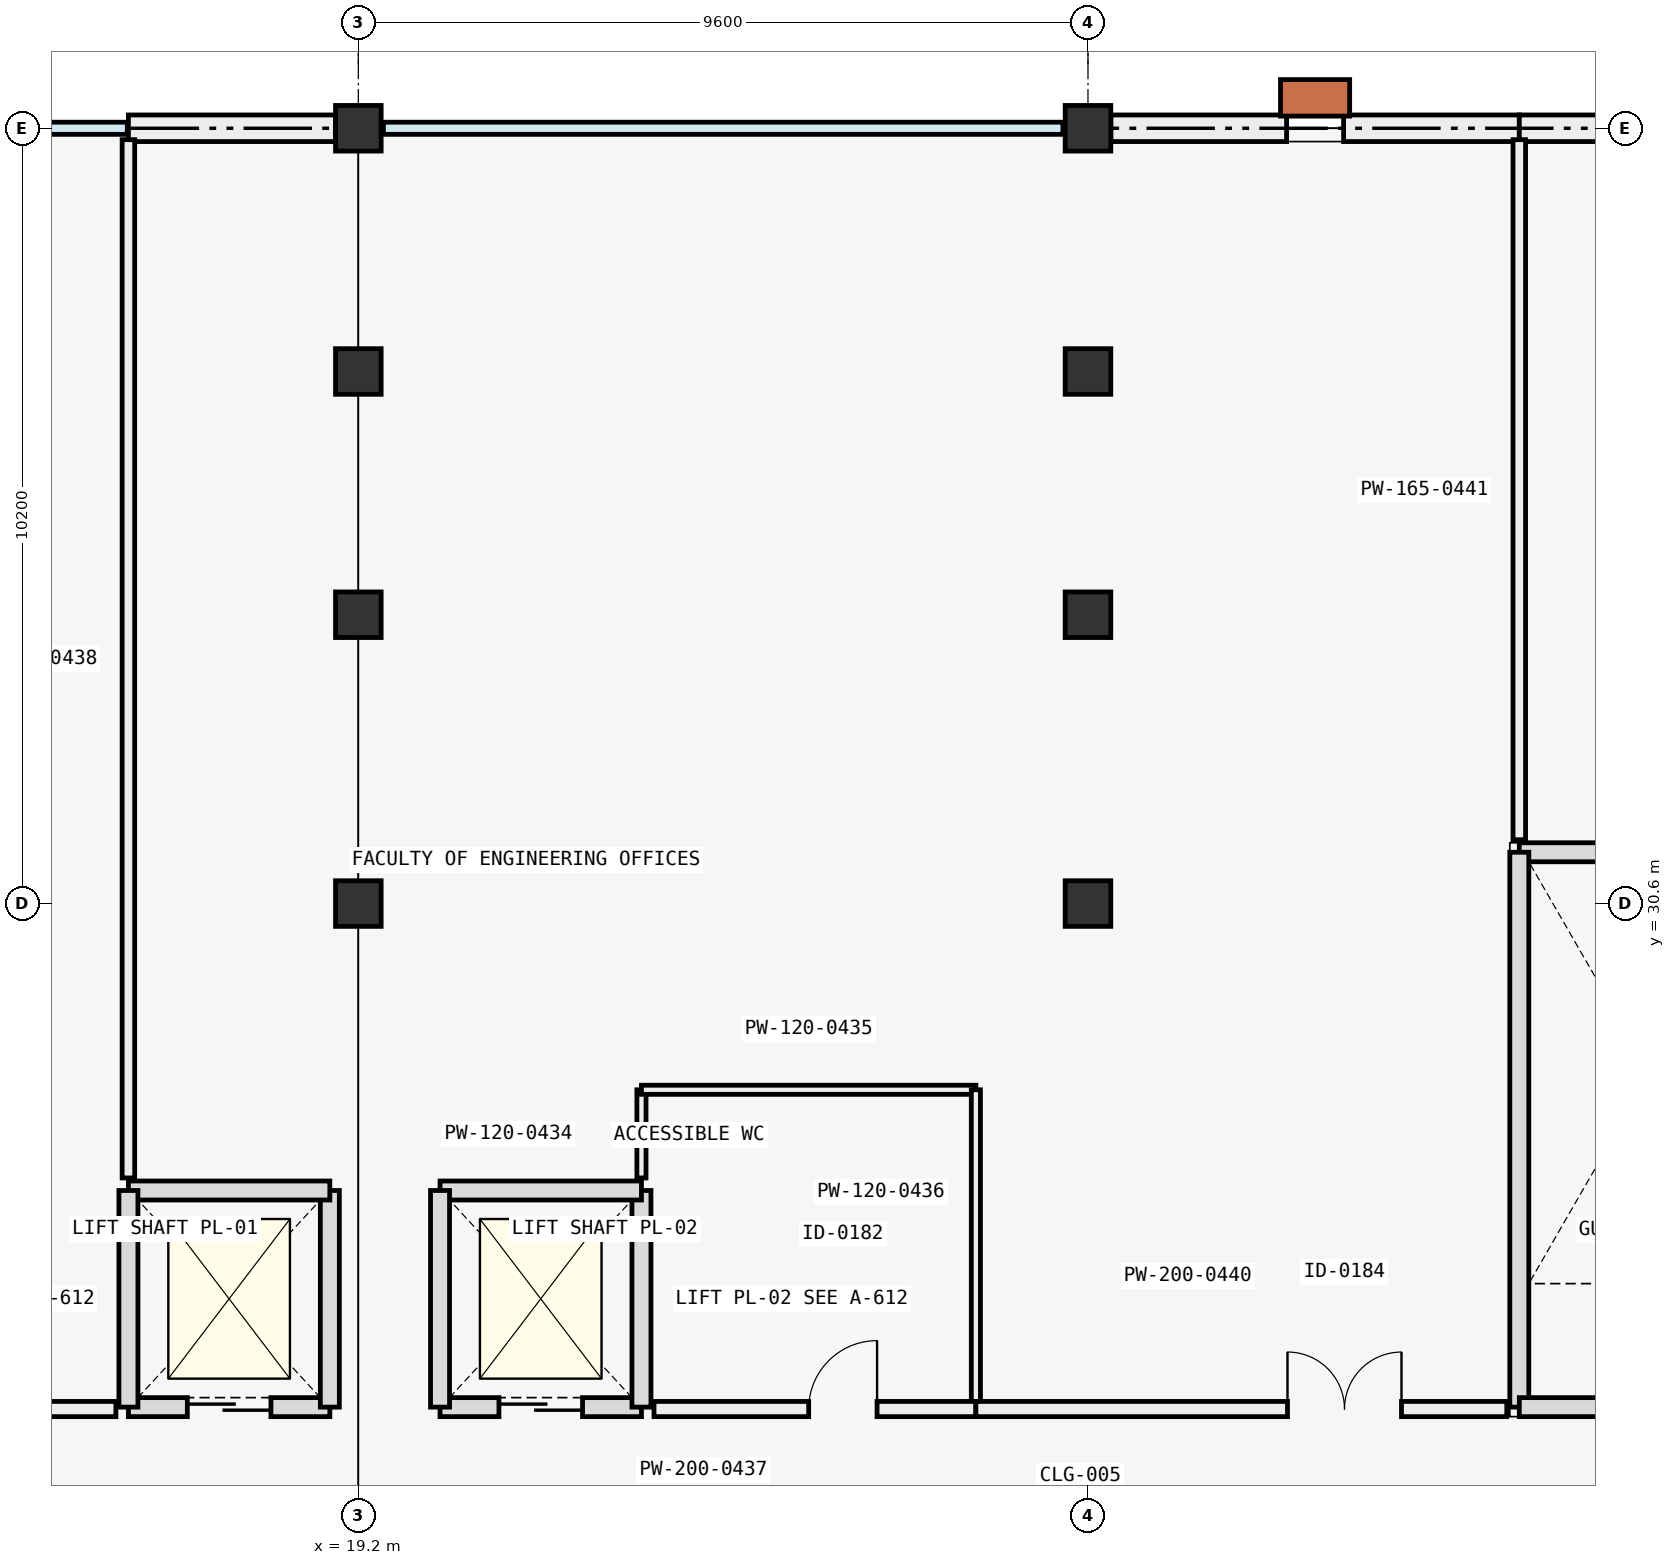
"""IFC4 building model, lengths in metres.
Left out: names, types, materials, properties, quantities, classifications, styles, units other than length and angle.
Written with IfcOpenShell. Run it as: python <this file> out.ifc"""

import sys

from ifc_helpers import new_model, si_unit, direction, frame, frame_2d, origin, origin_2d, place, context, subcontext, project, spatial, rectangle, extrude, element, fill, save


model = new_model("IFC4")
c1 = context("Model", 3, precision=1e-05, world=origin(), true_north=direction((0.0, 1.0)))
c2 = subcontext(c1, "Body", "Model", "MODEL_VIEW")
j1 = project(units=[si_unit("LENGTHUNIT", "METRE"), si_unit("PLANEANGLEUNIT", "RADIAN")], contexts=[c1])
p1 = place(None, origin())
s1 = spatial("IfcSite", under=j1, at=p1, CompositionType="ELEMENT")
p2 = place(p1, origin())
s2 = spatial("IfcBuilding", under=s1, at=p2, CompositionType="ELEMENT")
p3 = place(p2, frame((0.0, 0.0, 18.0)))
s3 = spatial("IfcBuildingStorey", under=s2, at=p3, CompositionType="ELEMENT", Elevation=18.0)
for number, where, z_axis, x_axis in (
    (1, (19.2, 30.6, 0.0), (0.0, 0.0, 1.0), (1.0, 0.0, 0.0)),
    (2, (19.2, 34.4, 0.0), (0.0, 0.0, 1.0), (1.0, 0.0, 0.0)),
    (3, (19.2, 37.6, 0.0), (0.0, 0.0, 1.0), (1.0, 0.0, 0.0)),
    (4, (19.2, 40.8, 0.0), (0.0, 0.0, 1.0), (1.0, 0.0, 0.0)),
    (5, (28.8, 30.6, 0.0), (0.0, 0.0, 1.0), (1.0, 0.0, 0.0)),
    (6, (28.8, 34.4, 0.0), (0.0, 0.0, 1.0), (1.0, 0.0, 0.0)),
    (7, (28.8, 37.6, 0.0), (0.0, 0.0, 1.0), (1.0, 0.0, 0.0)),
    (8, (28.8, 40.8, 0.0), (0.0, 0.0, 1.0), (1.0, 0.0, 0.0)),
):
    element("IfcColumn", number, at=place(p3, frame(where, z_axis=z_axis, x_axis=x_axis)), inside=s3, PredefinedType="COLUMN", context=c2, shape_type="SweptSolid", body=[
        extrude(rectangle(XDim=0.6, YDim=0.6, at=origin_2d()), origin(), (0.0, 0.0, 1.0), 4.2),
    ])
p4 = place(p3, frame((16.175, 40.8, 0.0), z_axis=(0.0, 0.0, 1.0), x_axis=(1.0, 0.0, 0.0)))
e9 = element("IfcWall", 9, at=p4, inside=s3, PredefinedType="SOLIDWALL", context=c2, shape_type="SweptSolid", body=[
    extrude(rectangle(XDim=2.724, YDim=0.35, at=frame_2d((1.362, 0.0))), origin(), (0.0, 0.0, 1.0), 2.33),
])
p5 = place(p3, frame((29.101, 40.8, 0.0), z_axis=(0.0, 0.0, 1.0), x_axis=(1.0, 0.0, 0.0)))
e10 = element("IfcWall", 10, at=p5, inside=s3, PredefinedType="SOLIDWALL", context=c2, shape_type="SweptSolid", body=[
    extrude(rectangle(XDim=5.374, YDim=0.35, at=frame_2d((2.687, 0.0))), origin(), (0.0, 0.0, 1.0), 2.33),
])
p6 = place(p5, frame((2.312, 0.0, 0.85)))
e11 = element("IfcOpeningElement", 11, at=p6, cuts=e10, PredefinedType="OPENING", context=c2, shape_type="SweptSolid", body=[
    extrude(rectangle(XDim=0.75, YDim=1.1, at=frame_2d((0.375, 0.55))), frame((0.0, 0.185, 0.0), z_axis=(0.0, -1.0, 0.0), x_axis=(1.0, 0.0, 0.0)), (0.0, 0.0, 1.0), 0.37),
])
p7 = place(p3, frame((34.475, 40.8, 0.0), z_axis=(0.0, 0.0, 1.0), x_axis=(1.0, 0.0, 0.0)))
e12 = element("IfcWall", 12, at=p7, inside=s3, PredefinedType="SOLIDWALL", context=c2, shape_type="SweptSolid", body=[
    extrude(rectangle(XDim=3.624, YDim=0.35, at=frame_2d((1.812, 0.0))), origin(), (0.0, 0.0, 1.0), 2.33),
])
p8 = place(p7, frame((1.437, 0.0, 0.85)))
e13 = element("IfcOpeningElement", 13, at=p8, cuts=e12, PredefinedType="OPENING", context=c2, shape_type="SweptSolid", body=[
    extrude(rectangle(XDim=0.75, YDim=1.1, at=frame_2d((0.375, 0.55))), frame((0.0, 0.185, 0.0), z_axis=(0.0, -1.0, 0.0), x_axis=(1.0, 0.0, 0.0)), (0.0, 0.0, 1.0), 0.37),
])
p9 = place(p3, frame((37.925, 31.275, 0.0), z_axis=(0.0, 0.0, 1.0), x_axis=(-1.0, 0.0, 0.0)))
e14 = element("IfcWall", 14, at=p9, inside=s3, PredefinedType="SOLIDWALL", context=c2, shape_type="SweptSolid", body=[
    extrude(rectangle(XDim=3.45, YDim=0.25, at=frame_2d((1.725, 0.0))), origin(), (0.0, 0.0, 1.0), 3.15),
])
p10 = place(p3, frame((34.475, 31.275, 0.0), z_axis=(0.0, 0.0, 1.0), x_axis=(0.0, -1.0, 0.0)))
e15 = element("IfcWall", 15, at=p10, inside=s3, PredefinedType="SOLIDWALL", context=c2, shape_type="SweptSolid", body=[
    extrude(rectangle(XDim=7.3, YDim=0.25, at=frame_2d((3.65, 0.0))), origin(), (0.0, 0.0, 1.0), 3.15),
])
p11 = place(p3, frame((34.475, 23.975, 0.0), z_axis=(0.0, 0.0, 1.0), x_axis=(1.0, 0.0, 0.0)))
e16 = element("IfcWall", 16, at=p11, inside=s3, PredefinedType="SOLIDWALL", context=c2, shape_type="SweptSolid", body=[
    extrude(rectangle(XDim=3.45, YDim=0.25, at=frame_2d((1.725, 0.0))), origin(), (0.0, 0.0, 1.0), 3.15),
])
p12 = place(p11, frame((1.175, 0.0, 0.0)))
e17 = element("IfcOpeningElement", 17, at=p12, cuts=e16, PredefinedType="OPENING", context=c2, shape_type="SweptSolid", body=[
    extrude(rectangle(XDim=1.1, YDim=2.2, at=frame_2d((0.55, 1.1))), frame((0.0, 0.135, 0.0), z_axis=(0.0, -1.0, 0.0), x_axis=(1.0, 0.0, 0.0)), (0.0, 0.0, 1.0), 0.27),
])
p13 = place(p3, frame((16.175, 23.975, 0.0), z_axis=(0.0, 0.0, 1.0), x_axis=(1.0, 0.0, 0.0)))
e18 = element("IfcWall", 18, at=p13, inside=s3, PredefinedType="SOLIDWALL", context=c2, shape_type="SweptSolid", body=[
    extrude(rectangle(XDim=2.65, YDim=0.25, at=frame_2d((1.325, 0.0))), origin(), (0.0, 0.0, 1.0), 3.95),
])
p14 = place(p13, frame((0.775, 0.0, 0.0)))
e19 = element("IfcOpeningElement", 19, at=p14, cuts=e18, PredefinedType="OPENING", context=c2, shape_type="SweptSolid", body=[
    extrude(rectangle(XDim=1.1, YDim=2.1, at=frame_2d((0.55, 1.05))), frame((0.0, 0.135, 0.0), z_axis=(0.0, -1.0, 0.0), x_axis=(1.0, 0.0, 0.0)), (0.0, 0.0, 1.0), 0.27),
])
p15 = place(p3, frame((18.825, 23.975, 0.0), z_axis=(0.0, 0.0, 1.0), x_axis=(0.0, 1.0, 0.0)))
e20 = element("IfcWall", 20, at=p15, inside=s3, PredefinedType="SOLIDWALL", context=c2, shape_type="SweptSolid", body=[
    extrude(rectangle(XDim=2.85, YDim=0.25, at=frame_2d((1.425, 0.0))), origin(), (0.0, 0.0, 1.0), 3.95),
])
p16 = place(p3, frame((18.825, 26.825, 0.0), z_axis=(0.0, 0.0, 1.0), x_axis=(-1.0, 0.0, 0.0)))
e21 = element("IfcWall", 21, at=p16, inside=s3, PredefinedType="SOLIDWALL", context=c2, shape_type="SweptSolid", body=[
    extrude(rectangle(XDim=2.65, YDim=0.25, at=frame_2d((1.325, 0.0))), origin(), (0.0, 0.0, 1.0), 3.95),
])
p17 = place(p3, frame((16.175, 26.825, 0.0), z_axis=(0.0, 0.0, 1.0), x_axis=(0.0, -1.0, 0.0)))
e22 = element("IfcWall", 22, at=p17, inside=s3, PredefinedType="SOLIDWALL", context=c2, shape_type="SweptSolid", body=[
    extrude(rectangle(XDim=2.85, YDim=0.25, at=frame_2d((1.425, 0.0))), origin(), (0.0, 0.0, 1.0), 3.95),
])
p18 = place(p3, frame((20.275, 23.975, 0.0), z_axis=(0.0, 0.0, 1.0), x_axis=(1.0, 0.0, 0.0)))
e23 = element("IfcWall", 23, at=p18, inside=s3, PredefinedType="SOLIDWALL", context=c2, shape_type="SweptSolid", body=[
    extrude(rectangle(XDim=2.65, YDim=0.25, at=frame_2d((1.325, 0.0))), origin(), (0.0, 0.0, 1.0), 3.95),
])
p19 = place(p18, frame((0.775, 0.0, 0.0)))
e24 = element("IfcOpeningElement", 24, at=p19, cuts=e23, PredefinedType="OPENING", context=c2, shape_type="SweptSolid", body=[
    extrude(rectangle(XDim=1.1, YDim=2.1, at=frame_2d((0.55, 1.05))), frame((0.0, 0.135, 0.0), z_axis=(0.0, -1.0, 0.0), x_axis=(1.0, 0.0, 0.0)), (0.0, 0.0, 1.0), 0.27),
])
p20 = place(p3, frame((22.925, 23.975, 0.0), z_axis=(0.0, 0.0, 1.0), x_axis=(0.0, 1.0, 0.0)))
e25 = element("IfcWall", 25, at=p20, inside=s3, PredefinedType="SOLIDWALL", context=c2, shape_type="SweptSolid", body=[
    extrude(rectangle(XDim=2.85, YDim=0.25, at=frame_2d((1.425, 0.0))), origin(), (0.0, 0.0, 1.0), 3.95),
])
p21 = place(p3, frame((22.925, 26.825, 0.0), z_axis=(0.0, 0.0, 1.0), x_axis=(-1.0, 0.0, 0.0)))
e26 = element("IfcWall", 26, at=p21, inside=s3, PredefinedType="SOLIDWALL", context=c2, shape_type="SweptSolid", body=[
    extrude(rectangle(XDim=2.65, YDim=0.25, at=frame_2d((1.325, 0.0))), origin(), (0.0, 0.0, 1.0), 3.95),
])
p22 = place(p3, frame((20.275, 26.825, 0.0), z_axis=(0.0, 0.0, 1.0), x_axis=(0.0, -1.0, 0.0)))
e27 = element("IfcWall", 27, at=p22, inside=s3, PredefinedType="SOLIDWALL", context=c2, shape_type="SweptSolid", body=[
    extrude(rectangle(XDim=2.85, YDim=0.25, at=frame_2d((1.425, 0.0))), origin(), (0.0, 0.0, 1.0), 3.95),
])
p23 = place(p3, frame((22.925, 26.99, 0.0), z_axis=(0.0, 0.0, 1.0), x_axis=(0.0, 1.0, 0.0)))
e28 = element("IfcWall", 28, at=p23, inside=s3, PredefinedType="PARTITIONING", context=c2, shape_type="SweptSolid", body=[
    extrude(rectangle(XDim=1.16, YDim=0.12, at=frame_2d((0.58, 0.0))), origin(), (0.0, 0.0, 1.0), 3.85),
])
p24 = place(p3, frame((22.925, 28.15, 0.0), z_axis=(0.0, 0.0, 1.0), x_axis=(1.0, 0.0, 0.0)))
e29 = element("IfcWall", 29, at=p24, inside=s3, PredefinedType="PARTITIONING", context=c2, shape_type="SweptSolid", body=[
    extrude(rectangle(XDim=4.4, YDim=0.12, at=frame_2d((2.2, 0.0))), origin(), (0.0, 0.0, 1.0), 3.85),
])
p25 = place(p3, frame((27.325, 23.95, 0.0), z_axis=(0.0, 0.0, 1.0), x_axis=(0.0, 1.0, 0.0)))
e30 = element("IfcWall", 30, at=p25, inside=s3, PredefinedType="PARTITIONING", context=c2, shape_type="SweptSolid", body=[
    extrude(rectangle(XDim=4.2, YDim=0.12, at=frame_2d((2.1, 0.0))), origin(), (0.0, 0.0, 1.0), 3.85),
])
p26 = place(p3, frame((23.09, 23.95, 0.0), z_axis=(0.0, 0.0, 1.0), x_axis=(1.0, 0.0, 0.0)))
e31 = element("IfcWall", 31, at=p26, inside=s3, PredefinedType="PARTITIONING", context=c2, shape_type="SweptSolid", body=[
    extrude(rectangle(XDim=4.235, YDim=0.2, at=frame_2d((2.117, 0.0))), origin(), (0.0, 0.0, 1.0), 3.85),
])
p27 = place(p26, frame((2.035, 0.0, 0.0)))
e32 = element("IfcOpeningElement", 32, at=p27, cuts=e31, PredefinedType="OPENING", context=c2, shape_type="SweptSolid", body=[
    extrude(rectangle(XDim=0.9, YDim=2.05, at=frame_2d((0.45, 1.025))), frame((0.0, 0.11, 0.0), z_axis=(0.0, -1.0, 0.0), x_axis=(1.0, 0.0, 0.0)), (0.0, 0.0, 1.0), 0.22),
])
p28 = place(p3, frame((16.175, 26.99, 0.0), z_axis=(0.0, 0.0, 1.0), x_axis=(0.0, 1.0, 0.0)))
e33 = element("IfcWall", 33, at=p28, inside=s3, PredefinedType="PARTITIONING", context=c2, shape_type="SweptSolid", body=[
    extrude(rectangle(XDim=13.66, YDim=0.165, at=frame_2d((6.83, 0.0))), origin(), (0.0, 0.0, 1.0), 3.28),
])
p29 = place(p3, frame((0.15, 23.95, 0.0), z_axis=(0.0, 0.0, 1.0), x_axis=(1.0, 0.0, 0.0)))
e34 = element("IfcWall", 34, at=p29, inside=s3, PredefinedType="PARTITIONING", context=c2, shape_type="SweptSolid", body=[
    extrude(rectangle(XDim=15.86, YDim=0.2, at=frame_2d((7.93, 0.0))), origin(), (0.0, 0.0, 1.0), 3.28),
])
p30 = place(p29, frame((6.05, 0.0, 0.0)))
e35 = element("IfcOpeningElement", 35, at=p30, cuts=e34, PredefinedType="OPENING", context=c2, shape_type="SweptSolid", body=[
    extrude(rectangle(XDim=1.5, YDim=2.2, at=frame_2d((0.75, 1.1))), frame((0.0, 0.11, 0.0), z_axis=(0.0, -1.0, 0.0), x_axis=(1.0, 0.0, 0.0)), (0.0, 0.0, 1.0), 0.22),
])
p31 = place(p3, frame((27.325, 23.95, 0.0), z_axis=(0.0, 0.0, 1.0), x_axis=(1.0, 0.0, 0.0)))
e36 = element("IfcWall", 36, at=p31, inside=s3, PredefinedType="PARTITIONING", context=c2, shape_type="SweptSolid", body=[
    extrude(rectangle(XDim=6.985, YDim=0.2, at=frame_2d((3.493, 0.0))), origin(), (0.0, 0.0, 1.0), 3.28),
])
p32 = place(p31, frame((4.1, 0.0, 0.0)))
e37 = element("IfcOpeningElement", 37, at=p32, cuts=e36, PredefinedType="OPENING", context=c2, shape_type="SweptSolid", body=[
    extrude(rectangle(XDim=1.5, YDim=2.2, at=frame_2d((0.75, 1.1))), frame((0.0, 0.11, 0.0), z_axis=(0.0, -1.0, 0.0), x_axis=(1.0, 0.0, 0.0)), (0.0, 0.0, 1.0), 0.22),
])
p33 = place(p3, frame((34.475, 31.44, 0.0), z_axis=(0.0, 0.0, 1.0), x_axis=(0.0, 1.0, 0.0)))
e38 = element("IfcWall", 38, at=p33, inside=s3, PredefinedType="PARTITIONING", context=c2, shape_type="SweptSolid", body=[
    extrude(rectangle(XDim=9.21, YDim=0.165, at=frame_2d((4.605, 0.0))), origin(), (0.0, 0.0, 1.0), 3.28),
])
p34 = place(p6, origin())
e39 = element("IfcWindow", 39, at=p34, inside=s3, PartitioningType="SINGLE_PANEL", PredefinedType="WINDOW", context=c2, shape_type="SweptSolid", body=[
    extrude(rectangle(XDim=0.75, YDim=1.1, at=frame_2d((0.375, 0.55))), frame((0.0, 0.03, 0.0), z_axis=(0.0, -1.0, 0.0), x_axis=(1.0, 0.0, 0.0)), (0.0, 0.0, 1.0), 0.06),
])
fill(e11, e39)
p35 = place(p14, origin())
e40 = element("IfcDoor", 40, at=p35, inside=s3, OperationType="SLIDING_TO_LEFT", PredefinedType="DOOR", context=c2, shape_type="SweptSolid", body=[
    extrude(rectangle(XDim=1.1, YDim=2.1, at=frame_2d((0.55, 1.05))), frame((0.0, 0.025, 0.0), z_axis=(0.0, -1.0, 0.0), x_axis=(1.0, 0.0, 0.0)), (0.0, 0.0, 1.0), 0.05),
])
fill(e19, e40)
p36 = place(p19, origin())
e41 = element("IfcDoor", 41, at=p36, inside=s3, OperationType="SLIDING_TO_LEFT", PredefinedType="DOOR", context=c2, shape_type="SweptSolid", body=[
    extrude(rectangle(XDim=1.1, YDim=2.1, at=frame_2d((0.55, 1.05))), frame((0.0, 0.025, 0.0), z_axis=(0.0, -1.0, 0.0), x_axis=(1.0, 0.0, 0.0)), (0.0, 0.0, 1.0), 0.05),
])
fill(e24, e41)
p37 = place(p27, origin())
e42 = element("IfcDoor", 42, at=p37, inside=s3, OperationType="SINGLE_SWING_RIGHT", PredefinedType="DOOR", context=c2, shape_type="SweptSolid", body=[
    extrude(rectangle(XDim=0.9, YDim=2.05, at=frame_2d((0.45, 1.025))), frame((0.0, 0.025, 0.0), z_axis=(0.0, -1.0, 0.0), x_axis=(1.0, 0.0, 0.0)), (0.0, 0.0, 1.0), 0.05),
])
fill(e32, e42)
p38 = place(p32, origin())
e43 = element("IfcDoor", 43, at=p38, inside=s3, OperationType="DOUBLE_DOOR_SINGLE_SWING", PredefinedType="DOOR", context=c2, shape_type="SweptSolid", body=[
    extrude(rectangle(XDim=1.5, YDim=2.2, at=frame_2d((0.75, 1.1))), frame((0.0, 0.025, 0.0), z_axis=(0.0, -1.0, 0.0), x_axis=(1.0, 0.0, 0.0)), (0.0, 0.0, 1.0), 0.05),
])
fill(e37, e43)
save(model, sys.argv[1])
